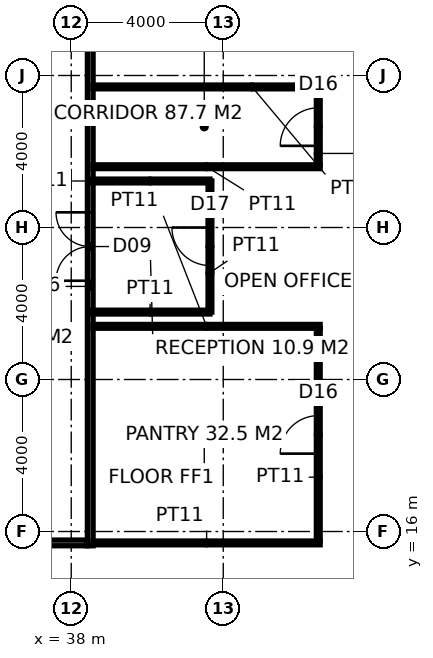
"""IFC4 building model, lengths in metres.
Left out: names, types, materials, properties, quantities, classifications, styles, units other than length and angle.
Written with IfcOpenShell. Run it as: python <this file> out.ifc"""

import sys

from ifc_helpers import new_model, si_unit, direction, frame, frame_2d, origin, place, context, subcontext, project, spatial, rectangle, extrude, element, fill, save


model = new_model("IFC4")
c1 = context("Model", 3, precision=1e-05, world=origin(), true_north=direction((0.0, 1.0)))
c2 = subcontext(c1, "Body", "Model", "MODEL_VIEW")
j1 = project(units=[si_unit("LENGTHUNIT", "METRE"), si_unit("PLANEANGLEUNIT", "RADIAN")], contexts=[c1])
p1 = place(None, origin())
s1 = spatial("IfcSite", under=j1, at=p1, CompositionType="ELEMENT")
p2 = place(p1, origin())
s2 = spatial("IfcBuilding", under=s1, at=p2, CompositionType="ELEMENT")
p3 = place(p2, frame((0.0, 0.0, 226.2)))
s3 = spatial("IfcBuildingStorey", under=s2, at=p3, CompositionType="ELEMENT", Elevation=226.2)
p4 = place(p3, frame((38.5, 15.625, 0.0), z_axis=(0.0, 0.0, 1.0), x_axis=(0.0, 1.0, 0.0)))
e1 = element("IfcWall", 1, at=p4, inside=s3, PredefinedType="PARTITIONING", context=c2, shape_type="SweptSolid", body=[
    extrude(rectangle(XDim=22.75, YDim=0.15, at=frame_2d((11.375, 0.0))), origin(), (0.0, 0.0, 1.0), 3.85),
])
p5 = place(p4, frame((6.974, 0.0, 0.0)))
e2 = element("IfcOpeningElement", 2, at=p5, cuts=e1, PredefinedType="OPENING", context=c2, shape_type="SweptSolid", body=[
    extrude(rectangle(XDim=1.8, YDim=2.4, at=frame_2d((0.9, 1.2))), frame((0.0, 0.085, 0.0), z_axis=(0.0, -1.0, 0.0), x_axis=(1.0, 0.0, 0.0)), (0.0, 0.0, 1.0), 0.17),
])
p6 = place(p4, frame((18.226, 0.0, 0.0)))
e3 = element("IfcOpeningElement", 3, at=p6, cuts=e1, PredefinedType="OPENING", context=c2, shape_type="SweptSolid", body=[
    extrude(rectangle(XDim=1.8, YDim=2.4, at=frame_2d((0.9, 1.2))), frame((0.0, 0.085, 0.0), z_axis=(0.0, -1.0, 0.0), x_axis=(1.0, 0.0, 0.0)), (0.0, 0.0, 1.0), 0.17),
])
p7 = place(p3, frame((15.775, 15.7, 0.0), z_axis=(0.0, 0.0, 1.0), x_axis=(1.0, 0.0, 0.0)))
e4 = element("IfcWall", 4, at=p7, inside=s3, PredefinedType="PARTITIONING", context=c2, shape_type="SweptSolid", body=[
    extrude(rectangle(XDim=22.65, YDim=0.15, at=frame_2d((11.325, 0.0))), origin(), (0.0, 0.0, 1.0), 3.85),
])
for number, where, z_axis, x_axis in (
    (5, (38.575, 15.7, 0.0), (0.0, 0.0, 1.0), (1.0, 0.0, 0.0)),
    (6, (38.575, 21.399, 0.0), (0.0, 0.0, 1.0), (1.0, 0.0, 0.0)),
    (7, (38.575, 25.599, 0.0), (0.0, 0.0, 1.0), (1.0, 0.0, 0.0)),
    (8, (38.575, 27.699, 0.0), (0.0, 0.0, 1.0), (1.0, 0.0, 0.0)),
):
    element("IfcWall", number, at=place(p3, frame(where, z_axis=z_axis, x_axis=x_axis)), inside=s3, PredefinedType="PARTITIONING", context=c2, shape_type="SweptSolid", body=[
        extrude(rectangle(XDim=5.975, YDim=0.1, at=frame_2d((2.988, 0.0))), origin(), (0.0, 0.0, 1.0), 3.85),
    ])
p8 = place(p3, frame((44.5, 15.75, 0.0), z_axis=(0.0, 0.0, 1.0), x_axis=(0.0, 1.0, 0.0)))
e9 = element("IfcWall", 9, at=p8, inside=s3, PredefinedType="PARTITIONING", context=c2, shape_type="SweptSolid", body=[
    extrude(rectangle(XDim=5.599, YDim=0.1, at=frame_2d((2.8, 0.0))), origin(), (0.0, 0.0, 1.0), 3.85),
])
p9 = place(p8, frame((2.3, 0.0, 0.0)))
e10 = element("IfcOpeningElement", 10, at=p9, cuts=e9, PredefinedType="OPENING", context=c2, shape_type="SweptSolid", body=[
    extrude(rectangle(XDim=1.0, YDim=2.2, at=frame_2d((0.5, 1.1))), frame((0.0, 0.06, 0.0), z_axis=(0.0, -1.0, 0.0), x_axis=(1.0, 0.0, 0.0)), (0.0, 0.0, 1.0), 0.12),
])
p10 = place(p3, frame((44.5, 25.649, 0.0), z_axis=(0.0, 0.0, 1.0), x_axis=(0.0, 1.0, 0.0)))
e11 = element("IfcWall", 11, at=p10, inside=s3, PredefinedType="PARTITIONING", context=c2, shape_type="SweptSolid", body=[
    extrude(rectangle(XDim=2.0, YDim=0.1, at=frame_2d((1.0, 0.0))), origin(), (0.0, 0.0, 1.0), 3.85),
])
p11 = place(p10, frame((0.5, 0.0, 0.0)))
e12 = element("IfcOpeningElement", 12, at=p11, cuts=e11, PredefinedType="OPENING", context=c2, shape_type="SweptSolid", body=[
    extrude(rectangle(XDim=1.0, YDim=2.2, at=frame_2d((0.5, 1.1))), frame((0.0, 0.06, 0.0), z_axis=(0.0, -1.0, 0.0), x_axis=(1.0, 0.0, 0.0)), (0.0, 0.0, 1.0), 0.12),
])
p12 = place(p3, frame((38.5, 21.774, 0.0), z_axis=(0.0, 0.0, 1.0), x_axis=(1.0, 0.0, 0.0)))
e13 = element("IfcWall", 13, at=p12, inside=s3, PredefinedType="PARTITIONING", context=c2, shape_type="SweptSolid", body=[
    extrude(rectangle(XDim=3.15, YDim=0.1, at=frame_2d((1.575, 0.0))), origin(), (0.0, 0.0, 1.0), 3.85),
])
p13 = place(p3, frame((41.65, 21.774, 0.0), z_axis=(0.0, 0.0, 1.0), x_axis=(0.0, 1.0, 0.0)))
e14 = element("IfcWall", 14, at=p13, inside=s3, PredefinedType="PARTITIONING", context=c2, shape_type="SweptSolid", body=[
    extrude(rectangle(XDim=3.45, YDim=0.1, at=frame_2d((1.725, 0.0))), origin(), (0.0, 0.0, 1.0), 3.85),
])
p14 = place(p13, frame((1.225, 0.0, 0.0)))
e15 = element("IfcOpeningElement", 15, at=p14, cuts=e14, PredefinedType="OPENING", context=c2, shape_type="SweptSolid", body=[
    extrude(rectangle(XDim=1.0, YDim=2.2, at=frame_2d((0.5, 1.1))), frame((0.0, 0.06, 0.0), z_axis=(0.0, -1.0, 0.0), x_axis=(1.0, 0.0, 0.0)), (0.0, 0.0, 1.0), 0.12),
])
p15 = place(p3, frame((41.65, 25.224, 0.0), z_axis=(0.0, 0.0, 1.0), x_axis=(-1.0, 0.0, 0.0)))
e16 = element("IfcWall", 16, at=p15, inside=s3, PredefinedType="PARTITIONING", context=c2, shape_type="SweptSolid", body=[
    extrude(rectangle(XDim=3.15, YDim=0.1, at=frame_2d((1.575, 0.0))), origin(), (0.0, 0.0, 1.0), 3.85),
])
p16 = place(p5, origin())
e17 = element("IfcDoor", 17, at=p16, inside=s3, OperationType="DOUBLE_DOOR_DOUBLE_SWING", PredefinedType="DOOR", context=c2, shape_type="SweptSolid", body=[
    extrude(rectangle(XDim=1.8, YDim=2.4, at=frame_2d((0.9, 1.2))), frame((0.0, 0.025, 0.0), z_axis=(0.0, -1.0, 0.0), x_axis=(1.0, 0.0, 0.0)), (0.0, 0.0, 1.0), 0.05),
])
fill(e2, e17)
p17 = place(p9, origin())
e18 = element("IfcDoor", 18, at=p17, inside=s3, OperationType="SINGLE_SWING_LEFT", PredefinedType="DOOR", context=c2, shape_type="SweptSolid", body=[
    extrude(rectangle(XDim=1.0, YDim=2.2, at=frame_2d((0.5, 1.1))), frame((0.0, 0.025, 0.0), z_axis=(0.0, -1.0, 0.0), x_axis=(1.0, 0.0, 0.0)), (0.0, 0.0, 1.0), 0.05),
])
fill(e10, e18)
p18 = place(p11, origin())
e19 = element("IfcDoor", 19, at=p18, inside=s3, OperationType="SINGLE_SWING_LEFT", PredefinedType="DOOR", context=c2, shape_type="SweptSolid", body=[
    extrude(rectangle(XDim=1.0, YDim=2.2, at=frame_2d((0.5, 1.1))), frame((0.0, 0.025, 0.0), z_axis=(0.0, -1.0, 0.0), x_axis=(1.0, 0.0, 0.0)), (0.0, 0.0, 1.0), 0.05),
])
fill(e12, e19)
p19 = place(p14, origin())
e20 = element("IfcDoor", 20, at=p19, inside=s3, OperationType="SINGLE_SWING_RIGHT", PredefinedType="DOOR", context=c2, shape_type="SweptSolid", body=[
    extrude(rectangle(XDim=1.0, YDim=2.2, at=frame_2d((0.5, 1.1))), frame((0.0, 0.025, 0.0), z_axis=(0.0, -1.0, 0.0), x_axis=(1.0, 0.0, 0.0)), (0.0, 0.0, 1.0), 0.05),
])
fill(e15, e20)
save(model, sys.argv[1])
